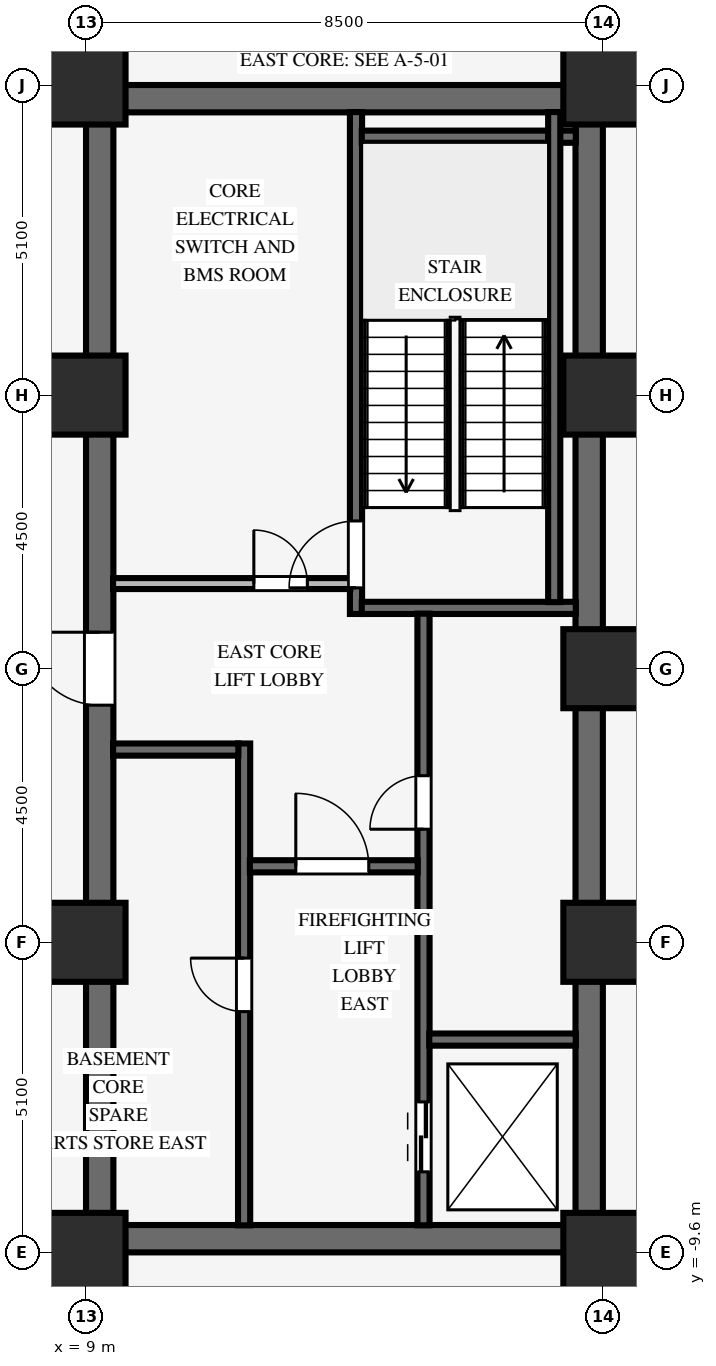
"""IFC4 building model, lengths in metres.
Left out: names, types, materials, properties, quantities, classifications, styles, units other than length and angle.
Written with IfcOpenShell. Run it as: python <this file> out.ifc"""

import sys

from ifc_helpers import new_model, si_unit, direction, frame, frame_2d, origin, origin_2d, place, context, subcontext, project, spatial, rectangle, extrude, source, transform, mapped, element, fill, save


model = new_model("IFC4")
c1 = context("Model", 3, precision=1e-05, world=origin(), true_north=direction((0.0, 1.0)))
c2 = subcontext(c1, "Body", "Model", "MODEL_VIEW")
j1 = project(units=[si_unit("LENGTHUNIT", "METRE"), si_unit("PLANEANGLEUNIT", "RADIAN")], contexts=[c1])
p1 = place(None, origin())
s1 = spatial("IfcSite", under=j1, at=p1, CompositionType="ELEMENT")
p2 = place(p1, origin())
s2 = spatial("IfcBuilding", under=s1, at=p2, CompositionType="ELEMENT")
p3 = place(p2, frame((0.0, 0.0, -8.4)))
s3 = spatial("IfcBuildingStorey", under=s2, at=p3, CompositionType="ELEMENT", Elevation=-8.4)
for number, where, z_axis, x_axis in (
    (1, (9.0, -9.375, 0.0), (0.0, 0.0, 1.0), (1.0, 0.0, 0.0)),
    (2, (9.0, 9.375, 0.0), (0.0, 0.0, 1.0), (1.0, 0.0, 0.0)),
):
    element("IfcWall", number, at=place(p3, frame(where, z_axis=z_axis, x_axis=x_axis)), inside=s3, PredefinedType="SHEAR", context=c2, shape_type="SweptSolid", body=[
        extrude(rectangle(XDim=8.5, YDim=0.45, at=frame_2d((4.25, 0.0))), origin(), (0.0, 0.0, 1.0), 3.85),
    ])
p4 = place(p3, frame((9.225, -9.155, 0.0), z_axis=(0.0, 0.0, 1.0), x_axis=(0.0, 1.0, 0.0)))
e3 = element("IfcWall", 3, at=p4, inside=s3, PredefinedType="SHEAR", context=c2, shape_type="SweptSolid", body=[
    extrude(rectangle(XDim=18.31, YDim=0.45, at=frame_2d((9.155, 0.0))), origin(), (0.0, 0.0, 1.0), 3.85),
])
p5 = place(p4, frame((8.555, 0.0, 0.0)))
e4 = element("IfcOpeningElement", 4, at=p5, cuts=e3, PredefinedType="OPENING", context=c2, shape_type="SweptSolid", body=[
    extrude(rectangle(XDim=1.2, YDim=2.15, at=frame_2d((0.6, 1.075))), frame((0.0, 0.235, 0.0), z_axis=(0.0, -1.0, 0.0), x_axis=(1.0, 0.0, 0.0)), (0.0, 0.0, 1.0), 0.47),
])
p6 = place(p3, frame((17.275, -9.155, 0.0), z_axis=(0.0, 0.0, 1.0), x_axis=(0.0, 1.0, 0.0)))
e5 = element("IfcWall", 5, at=p6, inside=s3, PredefinedType="SHEAR", context=c2, shape_type="SweptSolid", body=[
    extrude(rectangle(XDim=18.31, YDim=0.45, at=frame_2d((9.155, 0.0))), origin(), (0.0, 0.0, 1.0), 3.85),
])
for number, where, z_axis, x_axis in (
    (6, (9.0, -9.6, 0.0), (0.0, 0.0, 1.0), (1.0, 0.0, 0.0)),
    (7, (9.0, -4.5, 0.0), (0.0, 0.0, 1.0), (1.0, 0.0, 0.0)),
    (8, (9.0, 4.5, 0.0), (0.0, 0.0, 1.0), (1.0, 0.0, 0.0)),
    (9, (9.0, 9.6, 0.0), (0.0, 0.0, 1.0), (1.0, 0.0, 0.0)),
    (10, (17.5, -9.6, 0.0), (0.0, 0.0, 1.0), (1.0, 0.0, 0.0)),
    (11, (17.5, -4.5, 0.0), (0.0, 0.0, 1.0), (1.0, 0.0, 0.0)),
    (12, (17.5, 4.5, 0.0), (0.0, 0.0, 1.0), (1.0, 0.0, 0.0)),
    (13, (17.5, 9.6, 0.0), (0.0, 0.0, 1.0), (1.0, 0.0, 0.0)),
    (14, (17.5, 0.0, 0.0), (0.0, 0.0, 1.0), (1.0, 0.0, 0.0)),
):
    element("IfcColumn", number, at=place(p3, frame(where, z_axis=z_axis, x_axis=x_axis)), inside=s3, PredefinedType="COLUMN", context=c2, shape_type="SweptSolid", body=[
        extrude(rectangle(XDim=1.3, YDim=1.3, at=origin_2d()), origin(), (0.0, 0.0, 1.0), 3.85),
    ])
p7 = place(p3, frame((13.44, 0.9, 0.0), z_axis=(0.0, 0.0, 1.0), x_axis=(0.0, 1.0, 0.0)))
e15 = element("IfcWall", 15, at=p7, inside=s3, PredefinedType="SHEAR", context=c2, shape_type="SweptSolid", body=[
    extrude(rectangle(XDim=8.255, YDim=0.2, at=frame_2d((4.127, 0.0))), origin(), (0.0, 0.0, 1.0), 3.85),
])
p8 = place(p7, frame((0.43, 0.0, 0.0)))
e16 = element("IfcOpeningElement", 16, at=p8, cuts=e15, PredefinedType="OPENING", context=c2, shape_type="SweptSolid", body=[
    extrude(rectangle(XDim=1.1, YDim=2.15, at=frame_2d((0.55, 1.075))), frame((0.0, 0.11, 0.0), z_axis=(0.0, -1.0, 0.0), x_axis=(1.0, 0.0, 0.0)), (0.0, 0.0, 1.0), 0.22),
])
for number, where, z_axis, x_axis in (
    (17, (13.535, 1.0, 0.0), (0.0, 0.0, 1.0), (1.0, 0.0, 0.0)),
    (18, (13.535, 8.75, 0.0), (0.0, 0.0, 1.0), (1.0, 0.0, 0.0)),
):
    element("IfcWall", number, at=place(p3, frame(where, z_axis=z_axis, x_axis=x_axis)), inside=s3, PredefinedType="SHEAR", context=c2, shape_type="SweptSolid", body=[
        extrude(rectangle(XDim=3.52, YDim=0.2, at=frame_2d((1.76, 0.0))), origin(), (0.0, 0.0, 1.0), 3.85),
    ])
p9 = place(p3, frame((16.7, 1.095, 0.0), z_axis=(0.0, 0.0, 1.0), x_axis=(0.0, 1.0, 0.0)))
e19 = element("IfcWall", 19, at=p9, inside=s3, PredefinedType="SHEAR", context=c2, shape_type="SweptSolid", body=[
    extrude(rectangle(XDim=8.06, YDim=0.2, at=frame_2d((4.03, 0.0))), origin(), (0.0, 0.0, 1.0), 3.85),
])
p10 = place(p3, frame((14.55, -9.155, 0.0), z_axis=(0.0, 0.0, 1.0), x_axis=(0.0, 1.0, 0.0)))
e20 = element("IfcWall", 20, at=p10, inside=s3, PredefinedType="SHEAR", context=c2, shape_type="SweptSolid", body=[
    extrude(rectangle(XDim=10.06, YDim=0.2, at=frame_2d((5.03, 0.0))), origin(), (0.0, 0.0, 1.0), 3.85),
])
p11 = place(p10, frame((6.515, 0.0, 0.0)))
e21 = element("IfcOpeningElement", 21, at=p11, cuts=e20, PredefinedType="OPENING", context=c2, shape_type="SweptSolid", body=[
    extrude(rectangle(XDim=0.88, YDim=2.1, at=frame_2d((0.44, 1.05))), frame((0.0, 0.11, 0.0), z_axis=(0.0, -1.0, 0.0), x_axis=(1.0, 0.0, 0.0)), (0.0, 0.0, 1.0), 0.22),
])
p12 = place(p10, frame((0.88, 0.0, 0.0)))
e22 = element("IfcOpeningElement", 22, at=p12, cuts=e20, PredefinedType="OPENING", context=c2, shape_type="SweptSolid", body=[
    extrude(rectangle(XDim=1.15, YDim=2.15, at=frame_2d((0.575, 1.075))), frame((0.0, 0.11, 0.0), z_axis=(0.0, -1.0, 0.0), x_axis=(1.0, 0.0, 0.0)), (0.0, 0.0, 1.0), 0.22),
])
p13 = place(p3, frame((14.645, -6.1, 0.0), z_axis=(0.0, 0.0, 1.0), x_axis=(1.0, 0.0, 0.0)))
e23 = element("IfcWall", 23, at=p13, inside=s3, PredefinedType="SHEAR", context=c2, shape_type="SweptSolid", body=[
    extrude(rectangle(XDim=2.41, YDim=0.2, at=frame_2d((1.205, 0.0))), origin(), (0.0, 0.0, 1.0), 3.85),
])
p14 = place(p3, frame((11.6, -9.155, 0.0), z_axis=(0.0, 0.0, 1.0), x_axis=(0.0, 1.0, 0.0)))
e24 = element("IfcWall", 24, at=p14, inside=s3, PredefinedType="SHEAR", context=c2, shape_type="SweptSolid", body=[
    extrude(rectangle(XDim=7.925, YDim=0.2, at=frame_2d((3.962, 0.0))), origin(), (0.0, 0.0, 1.0), 3.85),
])
p15 = place(p14, frame((3.515, 0.0, 0.0)))
e25 = element("IfcOpeningElement", 25, at=p15, cuts=e24, PredefinedType="OPENING", context=c2, shape_type="SweptSolid", body=[
    extrude(rectangle(XDim=0.88, YDim=2.1, at=frame_2d((0.44, 1.05))), frame((0.0, 0.11, 0.0), z_axis=(0.0, -1.0, 0.0), x_axis=(1.0, 0.0, 0.0)), (0.0, 0.0, 1.0), 0.22),
])
p16 = place(p3, frame((11.695, -3.25, 0.0), z_axis=(0.0, 0.0, 1.0), x_axis=(1.0, 0.0, 0.0)))
e26 = element("IfcWall", 26, at=p16, inside=s3, PredefinedType="SHEAR", context=c2, shape_type="SweptSolid", body=[
    extrude(rectangle(XDim=2.76, YDim=0.2, at=frame_2d((1.38, 0.0))), origin(), (0.0, 0.0, 1.0), 3.85),
])
p17 = place(p16, frame((0.755, 0.0, 0.0)))
e27 = element("IfcOpeningElement", 27, at=p17, cuts=e26, PredefinedType="OPENING", context=c2, shape_type="SweptSolid", body=[
    extrude(rectangle(XDim=1.2, YDim=2.15, at=frame_2d((0.6, 1.075))), frame((0.0, 0.11, 0.0), z_axis=(0.0, -1.0, 0.0), x_axis=(1.0, 0.0, 0.0)), (0.0, 0.0, 1.0), 0.22),
])
p18 = place(p3, frame((9.445, -1.33, 0.0), z_axis=(0.0, 0.0, 1.0), x_axis=(1.0, 0.0, 0.0)))
e28 = element("IfcWall", 28, at=p18, inside=s3, PredefinedType="SHEAR", context=c2, shape_type="SweptSolid", body=[
    extrude(rectangle(XDim=2.06, YDim=0.2, at=frame_2d((1.03, 0.0))), origin(), (0.0, 0.0, 1.0), 3.85),
])
p19 = place(p3, frame((9.445, 1.4, 0.0), z_axis=(0.0, 0.0, 1.0), x_axis=(1.0, 0.0, 0.0)))
e29 = element("IfcWall", 29, at=p19, inside=s3, PredefinedType="PARTITIONING", context=c2, shape_type="SweptSolid", body=[
    extrude(rectangle(XDim=3.9, YDim=0.18, at=frame_2d((1.95, 0.0))), origin(), (0.0, 0.0, 1.0), 3.84),
])
p20 = place(p19, frame((2.315, 0.0, 0.0)))
e30 = element("IfcOpeningElement", 30, at=p20, cuts=e29, PredefinedType="OPENING", context=c2, shape_type="SweptSolid", body=[
    extrude(rectangle(XDim=0.88, YDim=2.1, at=frame_2d((0.44, 1.05))), frame((0.0, 0.1, 0.0), z_axis=(0.0, -1.0, 0.0), x_axis=(1.0, 0.0, 0.0)), (0.0, 0.0, 1.0), 0.2),
])
m1 = source(origin(), c2, "Body", "SweptSolid", [
    extrude(rectangle(XDim=1.1, YDim=2.15, at=frame_2d((0.55, 1.075))), frame((0.0, 0.025, 0.0), z_axis=(0.0, -1.0, 0.0), x_axis=(1.0, 0.0, 0.0)), (0.0, 0.0, 1.0), 0.05),
])
p21 = place(p8, origin())
e31 = element("IfcDoor", 31, at=p21, inside=s3, OperationType="SINGLE_SWING_LEFT", PredefinedType="DOOR", context=c2, shape_type="MappedRepresentation", body=[
    mapped(m1, transform((0.0, 0.0, 0.0), scale=1.0)),
])
fill(e16, e31)
m2 = source(origin(), c2, "Body", "SweptSolid", [
    extrude(rectangle(XDim=0.88, YDim=2.1, at=frame_2d((0.44, 1.05))), frame((0.0, 0.025, 0.0), z_axis=(0.0, -1.0, 0.0), x_axis=(1.0, 0.0, 0.0)), (0.0, 0.0, 1.0), 0.05),
])
p22 = place(p11, origin())
e32 = element("IfcDoor", 32, at=p22, inside=s3, OperationType="SINGLE_SWING_LEFT", PredefinedType="DOOR", context=c2, shape_type="MappedRepresentation", body=[
    mapped(m2, transform((0.0, 0.0, 0.0), scale=1.0)),
])
fill(e21, e32)
m3 = source(origin(), c2, "Body", "SweptSolid", [
    extrude(rectangle(XDim=1.2, YDim=2.15, at=frame_2d((0.6, 1.075))), frame((0.0, 0.025, 0.0), z_axis=(0.0, -1.0, 0.0), x_axis=(1.0, 0.0, 0.0)), (0.0, 0.0, 1.0), 0.05),
])
p23 = place(p17, origin())
e33 = element("IfcDoor", 33, at=p23, inside=s3, OperationType="SINGLE_SWING_LEFT", PredefinedType="DOOR", context=c2, shape_type="MappedRepresentation", body=[
    mapped(m3, transform((0.0, 0.0, 0.0), scale=1.0)),
])
fill(e27, e33)
p24 = place(p15, origin())
e34 = element("IfcDoor", 34, at=p24, inside=s3, OperationType="SINGLE_SWING_RIGHT", PredefinedType="DOOR", context=c2, shape_type="MappedRepresentation", body=[
    mapped(m2, transform((0.0, 0.0, 0.0), scale=1.0)),
])
fill(e25, e34)
p25 = place(p5, origin())
e35 = element("IfcDoor", 35, at=p25, inside=s3, OperationType="SINGLE_SWING_RIGHT", PredefinedType="DOOR", context=c2, shape_type="MappedRepresentation", body=[
    mapped(m3, transform((0.0, 0.0, 0.0), scale=1.0)),
])
fill(e4, e35)
p26 = place(p20, origin())
e36 = element("IfcDoor", 36, at=p26, inside=s3, OperationType="SINGLE_SWING_LEFT", PredefinedType="DOOR", context=c2, shape_type="MappedRepresentation", body=[
    mapped(m2, transform((0.0, 0.0, 0.0), scale=1.0)),
])
fill(e30, e36)
m4 = source(origin(), c2, "Body", "SweptSolid", [
    extrude(rectangle(XDim=1.15, YDim=2.15, at=frame_2d((0.575, 1.075))), frame((0.0, 0.025, 0.0), z_axis=(0.0, -1.0, 0.0), x_axis=(1.0, 0.0, 0.0)), (0.0, 0.0, 1.0), 0.05),
])
p27 = place(p12, origin())
e37 = element("IfcDoor", 37, at=p27, inside=s3, OperationType="DOUBLE_DOOR_SLIDING", PredefinedType="DOOR", context=c2, shape_type="MappedRepresentation", body=[
    mapped(m4, transform((0.0, 0.0, 0.0), scale=1.0)),
])
fill(e22, e37)
save(model, sys.argv[1])
